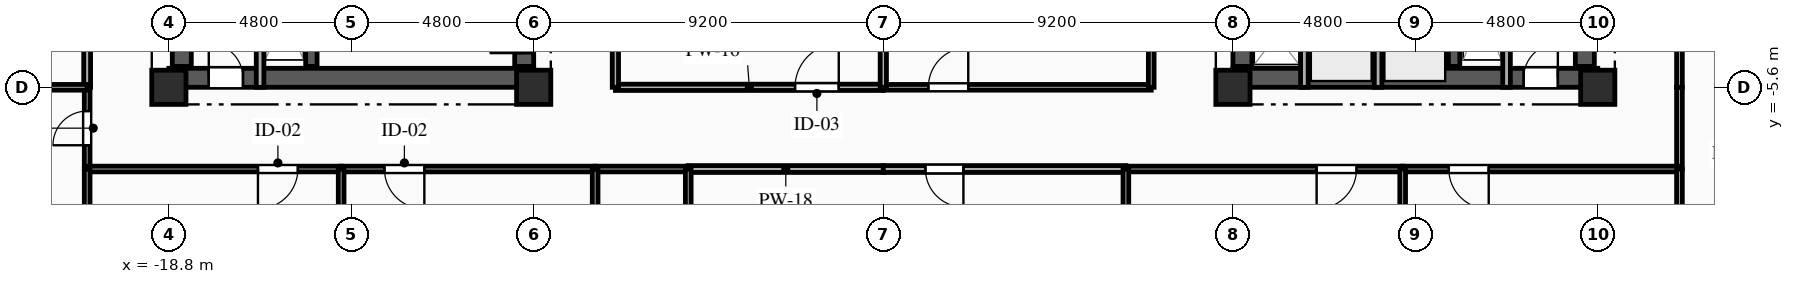
"""IFC4 building model, lengths in metres.
Left out: names, types, materials, properties, quantities, classifications, styles, units other than length and angle.
Written with IfcOpenShell. Run it as: python <this file> out.ifc"""

import sys

from ifc_helpers import new_model, si_unit, direction, frame, frame_2d, origin, origin_2d, place, context, subcontext, project, spatial, rectangle, extrude, element, fill, save


model = new_model("IFC4")
c1 = context("Model", 3, precision=1e-05, world=origin(), true_north=direction((0.0, 1.0)))
c2 = subcontext(c1, "Body", "Model", "MODEL_VIEW")
j1 = project(units=[si_unit("LENGTHUNIT", "METRE"), si_unit("PLANEANGLEUNIT", "RADIAN")], contexts=[c1])
p1 = place(None, origin())
s1 = spatial("IfcSite", under=j1, at=p1, CompositionType="ELEMENT")
p2 = place(p1, origin())
s2 = spatial("IfcBuilding", under=s1, at=p2, CompositionType="ELEMENT")
p3 = place(p2, frame((0.0, 0.0, 171.2)))
s3 = spatial("IfcBuildingStorey", under=s2, at=p3, CompositionType="ELEMENT", Elevation=171.2)
for number, where, z_axis, x_axis in (
    (1, (-18.8, -5.6, 0.0), (0.0, 0.0, 1.0), (1.0, 0.0, 0.0)),
    (2, (-9.2, -5.6, 0.0), (0.0, 0.0, 1.0), (1.0, 0.0, 0.0)),
    (3, (9.2, -5.6, 0.0), (0.0, 0.0, 1.0), (1.0, 0.0, 0.0)),
    (4, (18.8, -5.6, 0.0), (0.0, 0.0, 1.0), (1.0, 0.0, 0.0)),
):
    element("IfcColumn", number, at=place(p3, frame(where, z_axis=z_axis, x_axis=x_axis)), inside=s3, PredefinedType="COLUMN", context=c2, shape_type="SweptSolid", body=[
        extrude(rectangle(XDim=0.9, YDim=0.9, at=origin_2d()), origin(), (0.0, 0.0, 1.0), 3.35),
    ])
p4 = place(p3, frame((-18.8, -5.35, 0.0), z_axis=(0.0, 0.0, 1.0), x_axis=(1.0, 0.0, 0.0)))
e5 = element("IfcWall", 5, at=p4, inside=s3, PredefinedType="SHEAR", context=c2, shape_type="SweptSolid", body=[
    extrude(rectangle(XDim=9.6, YDim=0.5, at=frame_2d((4.8, 0.0))), origin(), (0.0, 0.0, 1.0), 3.0),
])
p5 = place(p4, frame((1.05, 0.0, 0.0)))
e6 = element("IfcOpeningElement", 6, at=p5, cuts=e5, PredefinedType="OPENING", context=c2, shape_type="SweptSolid", body=[
    extrude(rectangle(XDim=0.9, YDim=2.1, at=frame_2d((0.45, 1.05))), frame((0.0, 0.26, 0.0), z_axis=(0.0, -1.0, 0.0), x_axis=(1.0, 0.0, 0.0)), (0.0, 0.0, 1.0), 0.52),
])
p6 = place(p3, frame((-18.46, -5.05, 0.0), z_axis=(0.0, 0.0, 1.0), x_axis=(0.0, 1.0, 0.0)))
e7 = element("IfcWall", 7, at=p6, inside=s3, PredefinedType="SHEAR", context=c2, shape_type="SweptSolid", body=[
    extrude(rectangle(XDim=10.1, YDim=0.5, at=frame_2d((5.05, 0.0))), origin(), (0.0, 0.0, 1.0), 3.0),
])
p7 = place(p3, frame((-9.45, -5.05, 0.0), z_axis=(0.0, 0.0, 1.0), x_axis=(0.0, 1.0, 0.0)))
e8 = element("IfcWall", 8, at=p7, inside=s3, PredefinedType="SHEAR", context=c2, shape_type="SweptSolid", body=[
    extrude(rectangle(XDim=10.1, YDim=0.5, at=frame_2d((5.05, 0.0))), origin(), (0.0, 0.0, 1.0), 3.0),
])
p8 = place(p7, frame((7.15, 0.0, 0.0)))
e9 = element("IfcOpeningElement", 9, at=p8, cuts=e8, PredefinedType="OPENING", context=c2, shape_type="SweptSolid", body=[
    extrude(rectangle(XDim=0.9, YDim=2.1, at=frame_2d((0.45, 1.05))), frame((0.0, 0.26, 0.0), z_axis=(0.0, -1.0, 0.0), x_axis=(1.0, 0.0, 0.0)), (0.0, 0.0, 1.0), 0.52),
])
p9 = place(p7, frame((2.4, 0.0, 0.0)))
e10 = element("IfcOpeningElement", 10, at=p9, cuts=e8, PredefinedType="OPENING", context=c2, shape_type="SweptSolid", body=[
    extrude(rectangle(XDim=1.2, YDim=2.15, at=frame_2d((0.6, 1.075))), frame((0.0, 0.26, 0.0), z_axis=(0.0, -1.0, 0.0), x_axis=(1.0, 0.0, 0.0)), (0.0, 0.0, 1.0), 0.52),
])
p10 = place(p7, frame((0.35, 0.0, 0.0)))
e11 = element("IfcOpeningElement", 11, at=p10, cuts=e8, PredefinedType="OPENING", context=c2, shape_type="SweptSolid", body=[
    extrude(rectangle(XDim=0.9, YDim=2.1, at=frame_2d((0.45, 1.05))), frame((0.0, 0.26, 0.0), z_axis=(0.0, -1.0, 0.0), x_axis=(1.0, 0.0, 0.0)), (0.0, 0.0, 1.0), 0.52),
])
p11 = place(p7, frame((5.0, 0.0, 0.0)))
e12 = element("IfcOpeningElement", 12, at=p11, cuts=e8, PredefinedType="OPENING", context=c2, shape_type="SweptSolid", body=[
    extrude(rectangle(XDim=0.9, YDim=2.1, at=frame_2d((0.45, 1.05))), frame((0.0, 0.26, 0.0), z_axis=(0.0, -1.0, 0.0), x_axis=(1.0, 0.0, 0.0)), (0.0, 0.0, 1.0), 0.52),
])
p12 = place(p3, frame((-15.05, -5.05, 0.0), z_axis=(0.0, 0.0, 1.0), x_axis=(0.0, 1.0, 0.0)))
e13 = element("IfcWall", 13, at=p12, inside=s3, PredefinedType="SHEAR", context=c2, shape_type="SweptSolid", body=[
    extrude(rectangle(XDim=10.1, YDim=0.3, at=frame_2d((5.05, 0.0))), origin(), (0.0, 0.0, 1.0), 3.0),
])
p13 = place(p3, frame((9.2, -5.35, 0.0), z_axis=(0.0, 0.0, 1.0), x_axis=(1.0, 0.0, 0.0)))
e14 = element("IfcWall", 14, at=p13, inside=s3, PredefinedType="SHEAR", context=c2, shape_type="SweptSolid", body=[
    extrude(rectangle(XDim=9.6, YDim=0.5, at=frame_2d((4.8, 0.0))), origin(), (0.0, 0.0, 1.0), 3.0),
])
p14 = place(p13, frame((7.65, 0.0, 0.0)))
e15 = element("IfcOpeningElement", 15, at=p14, cuts=e14, PredefinedType="OPENING", context=c2, shape_type="SweptSolid", body=[
    extrude(rectangle(XDim=0.9, YDim=2.1, at=frame_2d((0.45, 1.05))), frame((0.0, 0.26, 0.0), z_axis=(0.0, -1.0, 0.0), x_axis=(1.0, 0.0, 0.0)), (0.0, 0.0, 1.0), 0.52),
])
p15 = place(p3, frame((9.45, -5.05, 0.0), z_axis=(0.0, 0.0, 1.0), x_axis=(0.0, 1.0, 0.0)))
e16 = element("IfcWall", 16, at=p15, inside=s3, PredefinedType="SHEAR", context=c2, shape_type="SweptSolid", body=[
    extrude(rectangle(XDim=10.1, YDim=0.5, at=frame_2d((5.05, 0.0))), origin(), (0.0, 0.0, 1.0), 3.0),
])
p16 = place(p15, frame((7.15, 0.0, 0.0)))
e17 = element("IfcOpeningElement", 17, at=p16, cuts=e16, PredefinedType="OPENING", context=c2, shape_type="SweptSolid", body=[
    extrude(rectangle(XDim=0.9, YDim=2.1, at=frame_2d((0.45, 1.05))), frame((0.0, 0.26, 0.0), z_axis=(0.0, -1.0, 0.0), x_axis=(1.0, 0.0, 0.0)), (0.0, 0.0, 1.0), 0.52),
])
p17 = place(p15, frame((2.4, 0.0, 0.0)))
e18 = element("IfcOpeningElement", 18, at=p17, cuts=e16, PredefinedType="OPENING", context=c2, shape_type="SweptSolid", body=[
    extrude(rectangle(XDim=1.2, YDim=2.15, at=frame_2d((0.6, 1.075))), frame((0.0, 0.26, 0.0), z_axis=(0.0, -1.0, 0.0), x_axis=(1.0, 0.0, 0.0)), (0.0, 0.0, 1.0), 0.52),
])
p18 = place(p3, frame((18.46, -5.05, 0.0), z_axis=(0.0, 0.0, 1.0), x_axis=(0.0, 1.0, 0.0)))
e19 = element("IfcWall", 19, at=p18, inside=s3, PredefinedType="SHEAR", context=c2, shape_type="SweptSolid", body=[
    extrude(rectangle(XDim=10.1, YDim=0.5, at=frame_2d((5.05, 0.0))), origin(), (0.0, 0.0, 1.0), 3.0),
])
p19 = place(p3, frame((15.02, -5.05, 0.0), z_axis=(0.0, 0.0, 1.0), x_axis=(0.0, 1.0, 0.0)))
e20 = element("IfcWall", 20, at=p19, inside=s3, PredefinedType="SHEAR", context=c2, shape_type="SweptSolid", body=[
    extrude(rectangle(XDim=10.1, YDim=0.3, at=frame_2d((5.05, 0.0))), origin(), (0.0, 0.0, 1.0), 3.0),
])
for number, where, z_axis, x_axis in (
    (21, (-16.4, -5.6, 0.0), (0.0, 0.0, 1.0), (0.0, 1.0, 0.0)),
    (22, (16.4, -2.11, 0.0), (0.0, 0.0, 1.0), (0.0, -1.0, 0.0)),
):
    element("IfcWall", number, at=place(p3, frame(where, z_axis=z_axis, x_axis=x_axis)), inside=s3, PredefinedType="PARTITIONING", context=c2, shape_type="SweptSolid", body=[
        extrude(rectangle(XDim=3.49, YDim=0.2, at=frame_2d((1.745, 0.0))), origin(), (0.0, 0.0, 1.0), 3.0),
    ])
for number, where, z_axis, x_axis in (
    (23, (11.08, -5.6, 0.0), (0.0, 0.0, 1.0), (0.0, 1.0, 0.0)),
    (24, (13.02, -5.6, 0.0), (0.0, 0.0, 1.0), (0.0, 1.0, 0.0)),
):
    element("IfcWall", number, at=place(p3, frame(where, z_axis=z_axis, x_axis=x_axis)), inside=s3, PredefinedType="PARTITIONING", context=c2, shape_type="SweptSolid", body=[
        extrude(rectangle(XDim=2.25, YDim=0.2, at=frame_2d((1.125, 0.0))), origin(), (0.0, 0.0, 1.0), 3.0),
    ])
p20 = place(p3, frame((-20.95, -7.75, 0.0), z_axis=(0.0, 0.0, 1.0), x_axis=(0.0, 1.0, 0.0)))
e25 = element("IfcWall", 25, at=p20, inside=s3, PredefinedType="PARTITIONING", context=c2, shape_type="SweptSolid", body=[
    extrude(rectangle(XDim=2.15, YDim=0.15, at=frame_2d((1.075, 0.0))), origin(), (0.0, 0.0, 1.0), 3.0),
])
p21 = place(p20, frame((0.625, 0.0, 0.0)))
e26 = element("IfcOpeningElement", 26, at=p21, cuts=e25, PredefinedType="OPENING", context=c2, shape_type="SweptSolid", body=[
    extrude(rectangle(XDim=0.9, YDim=2.1, at=frame_2d((0.45, 1.05))), frame((0.0, 0.085, 0.0), z_axis=(0.0, -1.0, 0.0), x_axis=(1.0, 0.0, 0.0)), (0.0, 0.0, 1.0), 0.17),
])
p22 = place(p3, frame((-14.267, -7.75, 0.0), z_axis=(0.0, 0.0, 1.0), x_axis=(-1.0, 0.0, 0.0)))
e27 = element("IfcWall", 27, at=p22, inside=s3, PredefinedType="PARTITIONING", context=c2, shape_type="SweptSolid", body=[
    extrude(rectangle(XDim=6.683, YDim=0.15, at=frame_2d((3.342, 0.0))), origin(), (0.0, 0.0, 1.0), 3.0),
])
p23 = place(p22, frame((1.139, 0.0, 0.0)))
e28 = element("IfcOpeningElement", 28, at=p23, cuts=e27, PredefinedType="OPENING", context=c2, shape_type="SweptSolid", body=[
    extrude(rectangle(XDim=1.05, YDim=2.15, at=frame_2d((0.525, 1.075))), frame((0.0, 0.085, 0.0), z_axis=(0.0, -1.0, 0.0), x_axis=(1.0, 0.0, 0.0)), (0.0, 0.0, 1.0), 0.17),
])
p24 = place(p3, frame((-7.583, -7.75, 0.0), z_axis=(0.0, 0.0, 1.0), x_axis=(-1.0, 0.0, 0.0)))
e29 = element("IfcWall", 29, at=p24, inside=s3, PredefinedType="PARTITIONING", context=c2, shape_type="SweptSolid", body=[
    extrude(rectangle(XDim=6.684, YDim=0.15, at=frame_2d((3.342, 0.0))), origin(), (0.0, 0.0, 1.0), 3.0),
])
p25 = place(p24, frame((4.494, 0.0, 0.0)))
e30 = element("IfcOpeningElement", 30, at=p25, cuts=e29, PredefinedType="OPENING", context=c2, shape_type="SweptSolid", body=[
    extrude(rectangle(XDim=1.05, YDim=2.15, at=frame_2d((0.525, 1.075))), frame((0.0, 0.085, 0.0), z_axis=(0.0, -1.0, 0.0), x_axis=(1.0, 0.0, 0.0)), (0.0, 0.0, 1.0), 0.17),
])
p26 = place(p3, frame((0.0, -7.75, 0.0), z_axis=(0.0, 0.0, 1.0), x_axis=(-1.0, 0.0, 0.0)))
e31 = element("IfcWall", 31, at=p26, inside=s3, PredefinedType="PARTITIONING", context=c2, shape_type="SweptSolid", body=[
    extrude(rectangle(XDim=5.133, YDim=0.18, at=frame_2d((2.566, 0.0))), origin(), (0.0, 0.0, 1.0), 3.0),
])
p27 = place(p3, frame((-5.133, -7.75, 0.0), z_axis=(0.0, 0.0, 1.0), x_axis=(-1.0, 0.0, 0.0)))
e32 = element("IfcWall", 32, at=p27, inside=s3, PredefinedType="PLUMBINGWALL", context=c2, shape_type="SweptSolid", body=[
    extrude(rectangle(XDim=2.45, YDim=0.15, at=frame_2d((1.225, 0.0))), origin(), (0.0, 0.0, 1.0), 3.0),
])
p28 = place(p3, frame((-7.05, -5.6, 0.0), z_axis=(0.0, 0.0, 1.0), x_axis=(1.0, 0.0, 0.0)))
e33 = element("IfcWall", 33, at=p28, inside=s3, PredefinedType="PARTITIONING", context=c2, shape_type="SweptSolid", body=[
    extrude(rectangle(XDim=7.05, YDim=0.165, at=frame_2d((3.525, 0.0))), origin(), (0.0, 0.0, 1.0), 2.485),
])
p29 = place(p28, frame((4.728, 0.0, 0.0)))
e34 = element("IfcOpeningElement", 34, at=p29, cuts=e33, PredefinedType="OPENING", context=c2, shape_type="SweptSolid", body=[
    extrude(rectangle(XDim=1.15, YDim=2.15, at=frame_2d((0.575, 1.075))), frame((0.0, 0.093, 0.0), z_axis=(0.0, -1.0, 0.0), x_axis=(1.0, 0.0, 0.0)), (0.0, 0.0, 1.0), 0.185),
])
p30 = place(p3, frame((20.95, -5.6, 0.0), z_axis=(0.0, 0.0, 1.0), x_axis=(0.0, -1.0, 0.0)))
e35 = element("IfcWall", 35, at=p30, inside=s3, PredefinedType="PARTITIONING", context=c2, shape_type="SweptSolid", body=[
    extrude(rectangle(XDim=2.15, YDim=0.15, at=frame_2d((1.075, 0.0))), origin(), (0.0, 0.0, 1.0), 3.0),
])
p31 = place(p3, frame((6.383, -7.75, 0.0), z_axis=(0.0, 0.0, 1.0), x_axis=(-1.0, 0.0, 0.0)))
e36 = element("IfcWall", 36, at=p31, inside=s3, PredefinedType="PARTITIONING", context=c2, shape_type="SweptSolid", body=[
    extrude(rectangle(XDim=6.383, YDim=0.18, at=frame_2d((3.191, 0.0))), origin(), (0.0, 0.0, 1.0), 3.0),
])
p32 = place(p31, frame((4.275, 0.0, 0.0)))
e37 = element("IfcOpeningElement", 37, at=p32, cuts=e36, PredefinedType="OPENING", context=c2, shape_type="SweptSolid", body=[
    extrude(rectangle(XDim=1.0, YDim=2.15, at=frame_2d((0.5, 1.075))), frame((0.0, 0.1, 0.0), z_axis=(0.0, -1.0, 0.0), x_axis=(1.0, 0.0, 0.0)), (0.0, 0.0, 1.0), 0.2),
])
p33 = place(p3, frame((13.667, -7.75, 0.0), z_axis=(0.0, 0.0, 1.0), x_axis=(-1.0, 0.0, 0.0)))
e38 = element("IfcWall", 38, at=p33, inside=s3, PredefinedType="PARTITIONING", context=c2, shape_type="SweptSolid", body=[
    extrude(rectangle(XDim=7.283, YDim=0.15, at=frame_2d((3.642, 0.0))), origin(), (0.0, 0.0, 1.0), 3.0),
])
p34 = place(p33, frame((1.214, 0.0, 0.0)))
e39 = element("IfcOpeningElement", 39, at=p34, cuts=e38, PredefinedType="OPENING", context=c2, shape_type="SweptSolid", body=[
    extrude(rectangle(XDim=1.05, YDim=2.15, at=frame_2d((0.525, 1.075))), frame((0.0, 0.085, 0.0), z_axis=(0.0, -1.0, 0.0), x_axis=(1.0, 0.0, 0.0)), (0.0, 0.0, 1.0), 0.17),
])
p35 = place(p3, frame((20.95, -7.75, 0.0), z_axis=(0.0, 0.0, 1.0), x_axis=(-1.0, 0.0, 0.0)))
e40 = element("IfcWall", 40, at=p35, inside=s3, PredefinedType="PARTITIONING", context=c2, shape_type="SweptSolid", body=[
    extrude(rectangle(XDim=7.283, YDim=0.15, at=frame_2d((3.642, 0.0))), origin(), (0.0, 0.0, 1.0), 3.0),
])
p36 = place(p35, frame((5.019, 0.0, 0.0)))
e41 = element("IfcOpeningElement", 41, at=p36, cuts=e40, PredefinedType="OPENING", context=c2, shape_type="SweptSolid", body=[
    extrude(rectangle(XDim=1.05, YDim=2.15, at=frame_2d((0.525, 1.075))), frame((0.0, 0.085, 0.0), z_axis=(0.0, -1.0, 0.0), x_axis=(1.0, 0.0, 0.0)), (0.0, 0.0, 1.0), 0.17),
])
p37 = place(p3, frame((0.0, -5.6, 0.0), z_axis=(0.0, 0.0, 1.0), x_axis=(1.0, 0.0, 0.0)))
e42 = element("IfcWall", 42, at=p37, inside=s3, PredefinedType="PARTITIONING", context=c2, shape_type="SweptSolid", body=[
    extrude(rectangle(XDim=7.05, YDim=0.15, at=frame_2d((3.525, 0.0))), origin(), (0.0, 0.0, 1.0), 2.485),
])
p38 = place(p37, frame((1.185, 0.0, 0.0)))
e43 = element("IfcOpeningElement", 43, at=p38, cuts=e42, PredefinedType="OPENING", context=c2, shape_type="SweptSolid", body=[
    extrude(rectangle(XDim=1.05, YDim=2.15, at=frame_2d((0.525, 1.075))), frame((0.0, 0.085, 0.0), z_axis=(0.0, -1.0, 0.0), x_axis=(1.0, 0.0, 0.0)), (0.0, 0.0, 1.0), 0.17),
])
p39 = place(p3, frame((-20.95, -5.6, 0.0), z_axis=(0.0, 0.0, 1.0), x_axis=(0.0, 1.0, 0.0)))
e44 = element("IfcWall", 44, at=p39, inside=s3, PredefinedType="PARTITIONING", context=c2, shape_type="SweptSolid", body=[
    extrude(rectangle(XDim=14.1, YDim=0.18, at=frame_2d((7.05, 0.0))), origin(), (0.0, 0.0, 1.0), 3.0),
])
p40 = place(p39, frame((5.058, 0.0, 0.0)))
e45 = element("IfcOpeningElement", 45, at=p40, cuts=e44, PredefinedType="OPENING", context=c2, shape_type="SweptSolid", body=[
    extrude(rectangle(XDim=1.0, YDim=2.15, at=frame_2d((0.5, 1.075))), frame((0.0, 0.1, 0.0), z_axis=(0.0, -1.0, 0.0), x_axis=(1.0, 0.0, 0.0)), (0.0, 0.0, 1.0), 0.2),
])
p41 = place(p3, frame((20.95, 2.4, 0.0), z_axis=(0.0, 0.0, 1.0), x_axis=(0.0, -1.0, 0.0)))
e46 = element("IfcWall", 46, at=p41, inside=s3, PredefinedType="PARTITIONING", context=c2, shape_type="SweptSolid", body=[
    extrude(rectangle(XDim=8.0, YDim=0.15, at=frame_2d((4.0, 0.0))), origin(), (0.0, 0.0, 1.0), 3.0),
])
p42 = place(p41, frame((2.028, 0.0, 0.0)))
e47 = element("IfcOpeningElement", 47, at=p42, cuts=e46, PredefinedType="OPENING", context=c2, shape_type="SweptSolid", body=[
    extrude(rectangle(XDim=1.05, YDim=2.15, at=frame_2d((0.525, 1.075))), frame((0.0, 0.085, 0.0), z_axis=(0.0, -1.0, 0.0), x_axis=(1.0, 0.0, 0.0)), (0.0, 0.0, 1.0), 0.17),
])
p43 = place(p3, frame((-7.05, -2.95, 0.0), z_axis=(0.0, 0.0, 1.0), x_axis=(0.0, -1.0, 0.0)))
e48 = element("IfcWall", 48, at=p43, inside=s3, PredefinedType="PARTITIONING", context=c2, shape_type="SweptSolid", body=[
    extrude(rectangle(XDim=2.65, YDim=0.165, at=frame_2d((1.325, 0.0))), origin(), (0.0, 0.0, 1.0), 3.0),
])
p44 = place(p3, frame((7.05, -5.6, 0.0), z_axis=(0.0, 0.0, 1.0), x_axis=(0.0, 1.0, 0.0)))
e49 = element("IfcWall", 49, at=p44, inside=s3, PredefinedType="PARTITIONING", context=c2, shape_type="SweptSolid", body=[
    extrude(rectangle(XDim=2.65, YDim=0.15, at=frame_2d((1.325, 0.0))), origin(), (0.0, 0.0, 1.0), 3.0),
])
p45 = place(p3, frame((-20.95, -5.6, 0.0), z_axis=(0.0, 0.0, 1.0), x_axis=(-1.0, 0.0, 0.0)))
e50 = element("IfcWall", 50, at=p45, inside=s3, PredefinedType="PARTITIONING", context=c2, shape_type="SweptSolid", body=[
    extrude(rectangle(XDim=2.65, YDim=0.15, at=frame_2d((1.325, 0.0))), origin(), (0.0, 0.0, 1.0), 3.0),
])
p46 = place(p45, frame((0.965, 0.0, 0.0)))
e51 = element("IfcOpeningElement", 51, at=p46, cuts=e50, PredefinedType="OPENING", context=c2, shape_type="SweptSolid", body=[
    extrude(rectangle(XDim=1.05, YDim=2.15, at=frame_2d((0.525, 1.075))), frame((0.0, 0.085, 0.0), z_axis=(0.0, -1.0, 0.0), x_axis=(1.0, 0.0, 0.0)), (0.0, 0.0, 1.0), 0.17),
])
for number, where, z_axis, x_axis in (
    (52, (-20.95, -7.75, 0.0), (0.0, 0.0, 1.0), (0.0, -1.0, 0.0)),
    (53, (20.95, -15.6, 0.0), (0.0, 0.0, 1.0), (0.0, 1.0, 0.0)),
    (54, (-14.267, -7.75, 0.0), (0.0, 0.0, 1.0), (0.0, -1.0, 0.0)),
):
    element("IfcWall", number, at=place(p3, frame(where, z_axis=z_axis, x_axis=x_axis)), inside=s3, PredefinedType="PARTITIONING", context=c2, shape_type="SweptSolid", body=[
        extrude(rectangle(XDim=7.85, YDim=0.15, at=frame_2d((3.925, 0.0))), origin(), (0.0, 0.0, 1.0), 3.0),
    ])
for number, where, z_axis, x_axis in (
    (55, (-7.583, -7.75, 0.0), (0.0, 0.0, 1.0), (0.0, -1.0, 0.0)),
    (56, (-5.133, -9.9, 0.0), (0.0, 0.0, 1.0), (0.0, 1.0, 0.0)),
):
    element("IfcWall", number, at=place(p3, frame(where, z_axis=z_axis, x_axis=x_axis)), inside=s3, PredefinedType="PLUMBINGWALL", context=c2, shape_type="SweptSolid", body=[
        extrude(rectangle(XDim=2.15, YDim=0.15, at=frame_2d((1.075, 0.0))), origin(), (0.0, 0.0, 1.0), 3.0),
    ])
for number, where, z_axis, x_axis in (
    (57, (6.383, -7.75, 0.0), (0.0, 0.0, 1.0), (0.0, -1.0, 0.0)),
    (58, (13.667, -7.75, 0.0), (0.0, 0.0, 1.0), (0.0, -1.0, 0.0)),
):
    element("IfcWall", number, at=place(p3, frame(where, z_axis=z_axis, x_axis=x_axis)), inside=s3, PredefinedType="PARTITIONING", context=c2, shape_type="SweptSolid", body=[
        extrude(rectangle(XDim=7.85, YDim=0.15, at=frame_2d((3.925, 0.0))), origin(), (0.0, 0.0, 1.0), 3.0),
    ])
p47 = place(p3, frame((0.0, -2.95, 0.0), z_axis=(0.0, 0.0, 1.0), x_axis=(0.0, -1.0, 0.0)))
e59 = element("IfcWall", 59, at=p47, inside=s3, PredefinedType="PARTITIONING", context=c2, shape_type="SweptSolid", body=[
    extrude(rectangle(XDim=2.65, YDim=0.165, at=frame_2d((1.325, 0.0))), origin(), (0.0, 0.0, 1.0), 3.0),
])
p48 = place(p5, origin())
e60 = element("IfcDoor", 60, at=p48, inside=s3, OperationType="SINGLE_SWING_LEFT", PredefinedType="DOOR", context=c2, shape_type="SweptSolid", body=[
    extrude(rectangle(XDim=0.9, YDim=2.1, at=frame_2d((0.45, 1.05))), frame((0.0, 0.025, 0.0), z_axis=(0.0, -1.0, 0.0), x_axis=(1.0, 0.0, 0.0)), (0.0, 0.0, 1.0), 0.05),
])
fill(e6, e60)
p49 = place(p14, origin())
e61 = element("IfcDoor", 61, at=p49, inside=s3, OperationType="SINGLE_SWING_RIGHT", PredefinedType="DOOR", context=c2, shape_type="SweptSolid", body=[
    extrude(rectangle(XDim=0.9, YDim=2.1, at=frame_2d((0.45, 1.05))), frame((0.0, 0.025, 0.0), z_axis=(0.0, -1.0, 0.0), x_axis=(1.0, 0.0, 0.0)), (0.0, 0.0, 1.0), 0.05),
])
fill(e15, e61)
p50 = place(p10, origin())
e62 = element("IfcDoor", 62, at=p50, inside=s3, OperationType="SINGLE_SWING_LEFT", PredefinedType="DOOR", context=c2, shape_type="SweptSolid", body=[
    extrude(rectangle(XDim=0.9, YDim=2.1, at=frame_2d((0.45, 1.05))), frame((0.0, 0.025, 0.0), z_axis=(0.0, -1.0, 0.0), x_axis=(1.0, 0.0, 0.0)), (0.0, 0.0, 1.0), 0.05),
])
fill(e11, e62)
p51 = place(p21, origin())
e63 = element("IfcDoor", 63, at=p51, inside=s3, OperationType="SINGLE_SWING_LEFT", PredefinedType="DOOR", context=c2, shape_type="SweptSolid", body=[
    extrude(rectangle(XDim=0.9, YDim=2.1, at=frame_2d((0.45, 1.05))), frame((0.0, 0.025, 0.0), z_axis=(0.0, -1.0, 0.0), x_axis=(1.0, 0.0, 0.0)), (0.0, 0.0, 1.0), 0.05),
])
fill(e26, e63)
p52 = place(p23, origin())
e64 = element("IfcDoor", 64, at=p52, inside=s3, OperationType="SINGLE_SWING_RIGHT", PredefinedType="DOOR", context=c2, shape_type="SweptSolid", body=[
    extrude(rectangle(XDim=1.05, YDim=2.15, at=frame_2d((0.525, 1.075))), frame((0.0, 0.025, 0.0), z_axis=(0.0, -1.0, 0.0), x_axis=(1.0, 0.0, 0.0)), (0.0, 0.0, 1.0), 0.05),
])
fill(e28, e64)
p53 = place(p25, origin())
e65 = element("IfcDoor", 65, at=p53, inside=s3, OperationType="SINGLE_SWING_LEFT", PredefinedType="DOOR", context=c2, shape_type="SweptSolid", body=[
    extrude(rectangle(XDim=1.05, YDim=2.15, at=frame_2d((0.525, 1.075))), frame((0.0, 0.025, 0.0), z_axis=(0.0, -1.0, 0.0), x_axis=(1.0, 0.0, 0.0)), (0.0, 0.0, 1.0), 0.05),
])
fill(e30, e65)
p54 = place(p29, origin())
e66 = element("IfcDoor", 66, at=p54, inside=s3, OperationType="SINGLE_SWING_RIGHT", PredefinedType="DOOR", context=c2, shape_type="SweptSolid", body=[
    extrude(rectangle(XDim=1.15, YDim=2.15, at=frame_2d((0.575, 1.075))), frame((0.0, 0.025, 0.0), z_axis=(0.0, -1.0, 0.0), x_axis=(1.0, 0.0, 0.0)), (0.0, 0.0, 1.0), 0.05),
])
fill(e34, e66)
p55 = place(p32, origin())
e67 = element("IfcDoor", 67, at=p55, inside=s3, OperationType="SINGLE_SWING_LEFT", PredefinedType="DOOR", context=c2, shape_type="SweptSolid", body=[
    extrude(rectangle(XDim=1.0, YDim=2.15, at=frame_2d((0.5, 1.075))), frame((0.0, 0.025, 0.0), z_axis=(0.0, -1.0, 0.0), x_axis=(1.0, 0.0, 0.0)), (0.0, 0.0, 1.0), 0.05),
])
fill(e37, e67)
p56 = place(p34, origin())
e68 = element("IfcDoor", 68, at=p56, inside=s3, OperationType="SINGLE_SWING_RIGHT", PredefinedType="DOOR", context=c2, shape_type="SweptSolid", body=[
    extrude(rectangle(XDim=1.05, YDim=2.15, at=frame_2d((0.525, 1.075))), frame((0.0, 0.025, 0.0), z_axis=(0.0, -1.0, 0.0), x_axis=(1.0, 0.0, 0.0)), (0.0, 0.0, 1.0), 0.05),
])
fill(e39, e68)
p57 = place(p36, origin())
e69 = element("IfcDoor", 69, at=p57, inside=s3, OperationType="SINGLE_SWING_LEFT", PredefinedType="DOOR", context=c2, shape_type="SweptSolid", body=[
    extrude(rectangle(XDim=1.05, YDim=2.15, at=frame_2d((0.525, 1.075))), frame((0.0, 0.025, 0.0), z_axis=(0.0, -1.0, 0.0), x_axis=(1.0, 0.0, 0.0)), (0.0, 0.0, 1.0), 0.05),
])
fill(e41, e69)
p58 = place(p38, origin())
e70 = element("IfcDoor", 70, at=p58, inside=s3, OperationType="SINGLE_SWING_RIGHT", PredefinedType="DOOR", context=c2, shape_type="SweptSolid", body=[
    extrude(rectangle(XDim=1.05, YDim=2.15, at=frame_2d((0.525, 1.075))), frame((0.0, 0.025, 0.0), z_axis=(0.0, -1.0, 0.0), x_axis=(1.0, 0.0, 0.0)), (0.0, 0.0, 1.0), 0.05),
])
fill(e43, e70)
save(model, sys.argv[1])
